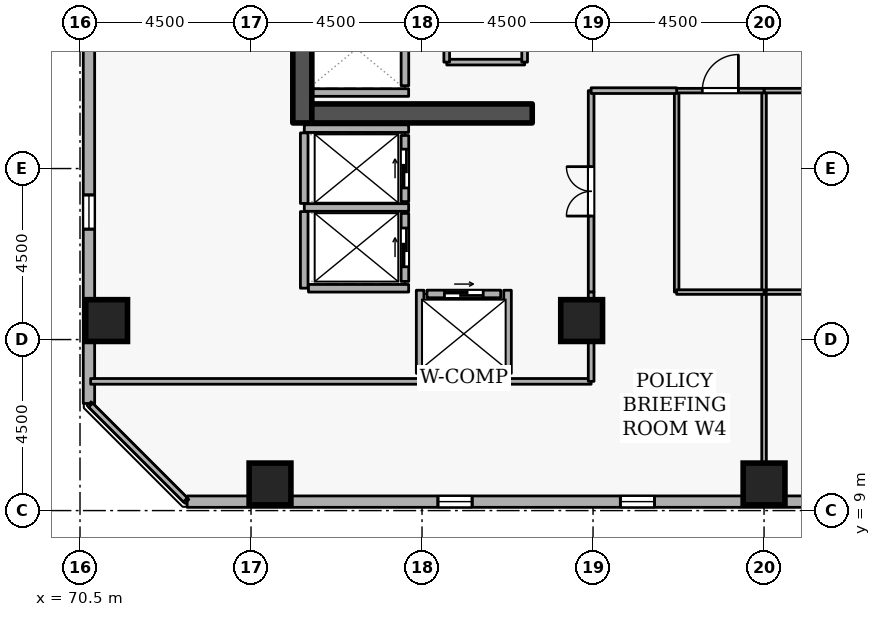
"""IFC4 building model, lengths in metres.
Left out: names, types, materials, properties, quantities, classifications, styles, units other than length and angle.
Written with IfcOpenShell. Run it as: python <this file> out.ifc"""

import sys

from ifc_helpers import new_model, si_unit, direction, frame, frame_2d, origin, origin_2d, place, context, subcontext, project, spatial, rectangle, extrude, element, fill, save


model = new_model("IFC4")
c1 = context("Model", 3, precision=1e-05, world=origin(), true_north=direction((0.0, 1.0)))
c2 = subcontext(c1, "Body", "Model", "MODEL_VIEW")
j1 = project(units=[si_unit("LENGTHUNIT", "METRE"), si_unit("PLANEANGLEUNIT", "RADIAN")], contexts=[c1])
p1 = place(None, origin())
s1 = spatial("IfcSite", under=j1, at=p1, CompositionType="ELEMENT")
p2 = place(p1, origin())
s2 = spatial("IfcBuilding", under=s1, at=p2, CompositionType="ELEMENT")
p3 = place(p2, frame((0.0, 0.0, 167.1)))
s3 = spatial("IfcBuildingStorey", under=s2, at=p3, CompositionType="ELEMENT", Elevation=167.1)
p4 = place(p3, frame((76.35, 19.2, 0.0), z_axis=(0.0, 0.0, 1.0), x_axis=(0.0, 1.0, 0.0)))
e1 = element("IfcWall", 1, at=p4, inside=s3, PredefinedType="SHEAR", context=c2, shape_type="SweptSolid", body=[
    extrude(rectangle(XDim=15.6, YDim=0.5, at=frame_2d((7.8, 0.0))), origin(), (0.0, 0.0, 1.0), 3.6),
])
p5 = place(p3, frame((76.6, 19.45, 0.0), z_axis=(0.0, 0.0, 1.0), x_axis=(1.0, 0.0, 0.0)))
e2 = element("IfcWall", 2, at=p5, inside=s3, PredefinedType="SHEAR", context=c2, shape_type="SweptSolid", body=[
    extrude(rectangle(XDim=5.8, YDim=0.5, at=frame_2d((2.9, 0.0))), origin(), (0.0, 0.0, 1.0), 3.6),
])
for number, where, z_axis, x_axis in (
    (3, (71.2, 14.0, 0.0), (0.0, 0.0, 1.0), (1.0, 0.0, 0.0)),
    (4, (88.5, 9.7, 0.0), (0.0, 0.0, 1.0), (1.0, 0.0, 0.0)),
    (5, (75.5, 9.7, 0.0), (0.0, 0.0, 1.0), (1.0, 0.0, 0.0)),
    (6, (83.7, 14.0, 0.0), (0.0, 0.0, 1.0), (1.0, 0.0, 0.0)),
):
    element("IfcColumn", number, at=place(p3, frame(where, z_axis=z_axis, x_axis=x_axis)), inside=s3, PredefinedType="COLUMN", context=c2, shape_type="SweptSolid", body=[
        extrude(rectangle(XDim=1.1, YDim=1.1, at=origin_2d()), origin(), (0.0, 0.0, 1.0), 3.6),
    ])
p6 = place(p3, frame((73.319, 9.235, 0.0), z_axis=(0.0, 0.0, 1.0), x_axis=(0.999999999634, 2.7061402e-05, 0.0)))
e7 = element("IfcWall", 7, at=p6, inside=s3, PredefinedType="STANDARD", context=c2, shape_type="SweptSolid", body=[
    extrude(rectangle(XDim=36.087, YDim=0.3, at=frame_2d((18.043, 0.0))), origin(), (0.0, 0.0, 1.0), 2.7),
])
p7 = place(p6, frame((6.6, 0.0, 0.72)))
e8 = element("IfcOpeningElement", 8, at=p7, cuts=e7, PredefinedType="OPENING", context=c2, shape_type="SweptSolid", body=[
    extrude(rectangle(XDim=0.9, YDim=1.75, at=frame_2d((0.45, 0.875))), frame((0.0, 0.16, 0.0), z_axis=(0.0, -1.0, 0.0), x_axis=(1.0, 0.0, 0.0)), (0.0, 0.0, 1.0), 0.32),
])
p8 = place(p6, frame((11.4, 0.0, 0.72)))
e9 = element("IfcOpeningElement", 9, at=p8, cuts=e7, PredefinedType="OPENING", context=c2, shape_type="SweptSolid", body=[
    extrude(rectangle(XDim=0.9, YDim=1.75, at=frame_2d((0.45, 0.875))), frame((0.0, 0.16, 0.0), z_axis=(0.0, -1.0, 0.0), x_axis=(1.0, 0.0, 0.0)), (0.0, 0.0, 1.0), 0.32),
])
p9 = place(p6, frame((21.0, 0.0, 0.72)))
e10 = element("IfcOpeningElement", 10, at=p9, cuts=e7, PredefinedType="OPENING", context=c2, shape_type="SweptSolid", body=[
    extrude(rectangle(XDim=0.9, YDim=1.75, at=frame_2d((0.45, 0.875))), frame((0.0, 0.16, 0.0), z_axis=(0.0, -1.0, 0.0), x_axis=(1.0, 0.0, 0.0)), (0.0, 0.0, 1.0), 0.32),
])
p10 = place(p6, frame((25.8, 0.0, 0.72)))
e11 = element("IfcOpeningElement", 11, at=p10, cuts=e7, PredefinedType="OPENING", context=c2, shape_type="SweptSolid", body=[
    extrude(rectangle(XDim=0.9, YDim=1.75, at=frame_2d((0.45, 0.875))), frame((0.0, 0.16, 0.0), z_axis=(0.0, -1.0, 0.0), x_axis=(1.0, 0.0, 0.0)), (0.0, 0.0, 1.0), 0.32),
])
p11 = place(p6, frame((30.6, 0.0, 0.72)))
e12 = element("IfcOpeningElement", 12, at=p11, cuts=e7, PredefinedType="OPENING", context=c2, shape_type="SweptSolid", body=[
    extrude(rectangle(XDim=0.9, YDim=1.75, at=frame_2d((0.45, 0.875))), frame((0.0, 0.16, 0.0), z_axis=(0.0, -1.0, 0.0), x_axis=(1.0, 0.0, 0.0)), (0.0, 0.0, 1.0), 0.32),
])
p12 = place(p3, frame((70.736, 47.906, 0.0), z_axis=(0.0, 0.0, 1.0), x_axis=(-2.7061402e-05, -0.999999999634, 0.0)))
e13 = element("IfcWall", 13, at=p12, inside=s3, PredefinedType="STANDARD", context=c2, shape_type="SweptSolid", body=[
    extrude(rectangle(XDim=36.087, YDim=0.3, at=frame_2d((18.043, 0.0))), origin(), (0.0, 0.0, 1.0), 2.7),
])
p13 = place(p12, frame((1.8, 0.0, 0.72)))
e14 = element("IfcOpeningElement", 14, at=p13, cuts=e13, PredefinedType="OPENING", context=c2, shape_type="SweptSolid", body=[
    extrude(rectangle(XDim=0.9, YDim=1.75, at=frame_2d((0.45, 0.875))), frame((0.0, 0.16, 0.0), z_axis=(0.0, -1.0, 0.0), x_axis=(1.0, 0.0, 0.0)), (0.0, 0.0, 1.0), 0.32),
])
p14 = place(p12, frame((11.4, 0.0, 0.72)))
e15 = element("IfcOpeningElement", 15, at=p14, cuts=e13, PredefinedType="OPENING", context=c2, shape_type="SweptSolid", body=[
    extrude(rectangle(XDim=0.9, YDim=1.75, at=frame_2d((0.45, 0.875))), frame((0.0, 0.16, 0.0), z_axis=(0.0, -1.0, 0.0), x_axis=(1.0, 0.0, 0.0)), (0.0, 0.0, 1.0), 0.32),
])
p15 = place(p12, frame((16.2, 0.0, 0.72)))
e16 = element("IfcOpeningElement", 16, at=p15, cuts=e13, PredefinedType="OPENING", context=c2, shape_type="SweptSolid", body=[
    extrude(rectangle(XDim=0.9, YDim=1.75, at=frame_2d((0.45, 0.875))), frame((0.0, 0.16, 0.0), z_axis=(0.0, -1.0, 0.0), x_axis=(1.0, 0.0, 0.0)), (0.0, 0.0, 1.0), 0.32),
])
p16 = place(p12, frame((25.8, 0.0, 0.72)))
e17 = element("IfcOpeningElement", 17, at=p16, cuts=e13, PredefinedType="OPENING", context=c2, shape_type="SweptSolid", body=[
    extrude(rectangle(XDim=0.9, YDim=1.75, at=frame_2d((0.45, 0.875))), frame((0.0, 0.16, 0.0), z_axis=(0.0, -1.0, 0.0), x_axis=(1.0, 0.0, 0.0)), (0.0, 0.0, 1.0), 0.32),
])
p17 = place(p12, frame((30.6, 0.0, 0.72)))
e18 = element("IfcOpeningElement", 18, at=p17, cuts=e13, PredefinedType="OPENING", context=c2, shape_type="SweptSolid", body=[
    extrude(rectangle(XDim=0.9, YDim=1.75, at=frame_2d((0.45, 0.875))), frame((0.0, 0.16, 0.0), z_axis=(0.0, -1.0, 0.0), x_axis=(1.0, 0.0, 0.0)), (0.0, 0.0, 1.0), 0.32),
])
p18 = place(p3, frame((79.05, 20.18, 0.0), z_axis=(0.0, 0.0, 1.0), x_axis=(0.0, 1.0, 0.0)))
e19 = element("IfcWall", 19, at=p18, inside=s3, PredefinedType="STANDARD", context=c2, shape_type="SweptSolid", body=[
    extrude(rectangle(XDim=1.94, YDim=0.2, at=frame_2d((0.97, 0.0))), origin(), (0.0, 0.0, 1.0), 3.34),
])
p19 = place(p3, frame((79.05, 17.13, 0.0), z_axis=(0.0, 0.0, 1.0), x_axis=(0.0, 1.0, 0.0)))
e20 = element("IfcWall", 20, at=p19, inside=s3, PredefinedType="STANDARD", context=c2, shape_type="SweptSolid", body=[
    extrude(rectangle(XDim=1.74, YDim=0.2, at=frame_2d((0.87, 0.0))), origin(), (0.0, 0.0, 1.0), 3.34),
])
p20 = place(p19, frame((0.36, 0.0, 0.0)))
e21 = element("IfcOpeningElement", 21, at=p20, cuts=e20, PredefinedType="OPENING", context=c2, shape_type="SweptSolid", body=[
    extrude(rectangle(XDim=1.02, YDim=2.06, at=frame_2d((0.51, 1.03))), frame((0.0, 0.11, 0.0), z_axis=(0.0, -1.0, 0.0), x_axis=(1.0, 0.0, 0.0)), (0.0, 0.0, 1.0), 0.22),
])
p21 = place(p3, frame((79.05, 15.03, 0.0), z_axis=(0.0, 0.0, 1.0), x_axis=(0.0, 1.0, 0.0)))
e22 = element("IfcWall", 22, at=p21, inside=s3, PredefinedType="STANDARD", context=c2, shape_type="SweptSolid", body=[
    extrude(rectangle(XDim=1.79, YDim=0.2, at=frame_2d((0.895, 0.0))), origin(), (0.0, 0.0, 1.0), 3.34),
])
p22 = place(p21, frame((0.385, 0.0, 0.0)))
e23 = element("IfcOpeningElement", 23, at=p22, cuts=e22, PredefinedType="OPENING", context=c2, shape_type="SweptSolid", body=[
    extrude(rectangle(XDim=1.02, YDim=2.06, at=frame_2d((0.51, 1.03))), frame((0.0, 0.11, 0.0), z_axis=(0.0, -1.0, 0.0), x_axis=(1.0, 0.0, 0.0)), (0.0, 0.0, 1.0), 0.22),
])
p23 = place(p3, frame((79.63, 14.7, 0.0), z_axis=(0.0, 0.0, 1.0), x_axis=(1.0, 0.0, 0.0)))
e24 = element("IfcWall", 24, at=p23, inside=s3, PredefinedType="STANDARD", context=c2, shape_type="SweptSolid", body=[
    extrude(rectangle(XDim=1.94, YDim=0.2, at=frame_2d((0.97, 0.0))), origin(), (0.0, 0.0, 1.0), 3.34),
])
p24 = place(p23, frame((0.46, 0.0, 0.0)))
e25 = element("IfcOpeningElement", 25, at=p24, cuts=e24, PredefinedType="OPENING", context=c2, shape_type="SweptSolid", body=[
    extrude(rectangle(XDim=1.02, YDim=2.06, at=frame_2d((0.51, 1.03))), frame((0.0, 0.11, 0.0), z_axis=(0.0, -1.0, 0.0), x_axis=(1.0, 0.0, 0.0)), (0.0, 0.0, 1.0), 0.22),
])
p25 = place(p3, frame((76.612, 20.0, 0.0), z_axis=(0.0, 0.0, 1.0), x_axis=(1.0, 0.0, 0.0)))
e26 = element("IfcWall", 26, at=p25, inside=s3, PredefinedType="STANDARD", context=c2, shape_type="SweptSolid", body=[
    extrude(rectangle(XDim=2.536, YDim=0.2, at=frame_2d((1.268, 0.0))), origin(), (0.0, 0.0, 1.0), 3.34),
])
p26 = place(p3, frame((76.402, 19.05, 0.0), z_axis=(0.0, 0.0, 1.0), x_axis=(1.0, 0.0, 0.0)))
e27 = element("IfcWall", 27, at=p26, inside=s3, PredefinedType="STANDARD", context=c2, shape_type="SweptSolid", body=[
    extrude(rectangle(XDim=2.746, YDim=0.2, at=frame_2d((1.373, 0.0))), origin(), (0.0, 0.0, 1.0), 2.545),
])
p27 = place(p3, frame((76.402, 16.975, 0.0), z_axis=(0.0, 0.0, 1.0), x_axis=(1.0, 0.0, 0.0)))
e28 = element("IfcWall", 28, at=p27, inside=s3, PredefinedType="STANDARD", context=c2, shape_type="SweptSolid", body=[
    extrude(rectangle(XDim=2.746, YDim=0.2, at=frame_2d((1.373, 0.0))), origin(), (0.0, 0.0, 1.0), 3.34),
])
p28 = place(p3, frame((76.4, 14.852, 0.0), z_axis=(0.0, 0.0, 1.0), x_axis=(0.0, 1.0, 0.0)))
e29 = element("IfcWall", 29, at=p28, inside=s3, PredefinedType="STANDARD", context=c2, shape_type="SweptSolid", body=[
    extrude(rectangle(XDim=2.016, YDim=0.2, at=frame_2d((1.008, 0.0))), origin(), (0.0, 0.0, 1.0), 3.34),
])
p29 = place(p3, frame((76.4, 17.082, 0.0), z_axis=(0.0, 0.0, 1.0), x_axis=(0.0, 1.0, 0.0)))
e30 = element("IfcWall", 30, at=p29, inside=s3, PredefinedType="STANDARD", context=c2, shape_type="SweptSolid", body=[
    extrude(rectangle(XDim=1.856, YDim=0.2, at=frame_2d((0.928, 0.0))), origin(), (0.0, 0.0, 1.0), 3.34),
])
p30 = place(p3, frame((76.512, 14.85, 0.0), z_axis=(0.0, 0.0, 1.0), x_axis=(1.0, 0.0, 0.0)))
e31 = element("IfcWall", 31, at=p30, inside=s3, PredefinedType="STANDARD", context=c2, shape_type="SweptSolid", body=[
    extrude(rectangle(XDim=2.636, YDim=0.2, at=frame_2d((1.318, 0.0))), origin(), (0.0, 0.0, 1.0), 3.34),
])
p31 = place(p3, frame((79.452, 12.5, 0.0), z_axis=(0.0, 0.0, 1.0), x_axis=(1.0, 0.0, 0.0)))
e32 = element("IfcWall", 32, at=p31, inside=s3, PredefinedType="STANDARD", context=c2, shape_type="SweptSolid", body=[
    extrude(rectangle(XDim=2.296, YDim=0.2, at=frame_2d((1.148, 0.0))), origin(), (0.0, 0.0, 1.0), 3.34),
])
for number, where, z_axis, x_axis in (
    (33, (81.75, 12.612, 0.0), (0.0, 0.0, 1.0), (0.0, 1.0, 0.0)),
    (34, (79.45, 12.612, 0.0), (0.0, 0.0, 1.0), (0.0, 1.0, 0.0)),
):
    element("IfcWall", number, at=place(p3, frame(where, z_axis=z_axis, x_axis=x_axis)), inside=s3, PredefinedType="STANDARD", context=c2, shape_type="SweptSolid", body=[
        extrude(rectangle(XDim=2.186, YDim=0.2, at=frame_2d((1.093, 0.0))), origin(), (0.0, 0.0, 1.0), 3.34),
    ])
p32 = place(p3, frame((82.2, 20.8, 0.0), z_axis=(0.0, 0.0, 1.0), x_axis=(-1.0, 0.0, 0.0)))
e35 = element("IfcWall", 35, at=p32, inside=s3, PredefinedType="PARTITIONING", context=c2, shape_type="SweptSolid", body=[
    extrude(rectangle(XDim=2.05, YDim=0.15, at=frame_2d((1.025, 0.0))), origin(), (0.0, 0.0, 1.0), 3.34),
])
p33 = place(p3, frame((80.15, 20.8, 0.0), z_axis=(0.0, 0.0, 1.0), x_axis=(0.0, 1.0, 0.0)))
e36 = element("IfcWall", 36, at=p33, inside=s3, PredefinedType="PARTITIONING", context=c2, shape_type="SweptSolid", body=[
    extrude(rectangle(XDim=3.25, YDim=0.15, at=frame_2d((1.625, 0.0))), origin(), (0.0, 0.0, 1.0), 3.34),
])
p34 = place(p3, frame((82.2, 24.05, 0.0), z_axis=(0.0, 0.0, 1.0), x_axis=(0.0, -1.0, 0.0)))
e37 = element("IfcWall", 37, at=p34, inside=s3, PredefinedType="PARTITIONING", context=c2, shape_type="SweptSolid", body=[
    extrude(rectangle(XDim=3.25, YDim=0.15, at=frame_2d((1.625, 0.0))), origin(), (0.0, 0.0, 1.0), 3.34),
])
p35 = place(p34, frame((1.165, 0.0, 0.0)))
e38 = element("IfcOpeningElement", 38, at=p35, cuts=e37, PredefinedType="OPENING", context=c2, shape_type="SweptSolid", body=[
    extrude(rectangle(XDim=0.92, YDim=2.08, at=frame_2d((0.46, 1.04))), frame((0.0, 0.085, 0.0), z_axis=(0.0, -1.0, 0.0), x_axis=(1.0, 0.0, 0.0)), (0.0, 0.0, 1.0), 0.17),
])
p36 = place(p3, frame((88.5, 9.28, 0.0), z_axis=(0.0, 0.0, 1.0), x_axis=(0.0, 1.0, 0.0)))
e39 = element("IfcWall", 39, at=p36, inside=s3, PredefinedType="PARTITIONING", context=c2, shape_type="SweptSolid", body=[
    extrude(rectangle(XDim=5.47, YDim=0.12, at=frame_2d((2.735, 0.0))), origin(), (0.0, 0.0, 1.0), 2.882),
])
p37 = place(p3, frame((88.5, 14.75, 0.0), z_axis=(0.0, 0.0, 1.0), x_axis=(1.0, 0.0, 0.0)))
e40 = element("IfcWall", 40, at=p37, inside=s3, PredefinedType="PARTITIONING", context=c2, shape_type="SweptSolid", body=[
    extrude(rectangle(XDim=4.55, YDim=0.12, at=frame_2d((2.275, 0.0))), origin(), (0.0, 0.0, 1.0), 3.34),
])
p38 = place(p3, frame((88.5, 14.75, 0.0), z_axis=(0.0, 0.0, 1.0), x_axis=(0.0, 1.0, 0.0)))
e41 = element("IfcWall", 41, at=p38, inside=s3, PredefinedType="PARTITIONING", context=c2, shape_type="SweptSolid", body=[
    extrude(rectangle(XDim=5.3, YDim=0.12, at=frame_2d((2.65, 0.0))), origin(), (0.0, 0.0, 1.0), 2.882),
])
p39 = place(p3, frame((88.5, 20.05, 0.0), z_axis=(0.0, 0.0, 1.0), x_axis=(1.0, 0.0, 0.0)))
e42 = element("IfcWall", 42, at=p39, inside=s3, PredefinedType="PARTITIONING", context=c2, shape_type="SweptSolid", body=[
    extrude(rectangle(XDim=4.55, YDim=0.12, at=frame_2d((2.275, 0.0))), origin(), (0.0, 0.0, 1.0), 3.34),
])
p40 = place(p3, frame((86.2, 14.75, 0.0), z_axis=(0.0, 0.0, 1.0), x_axis=(0.0, 1.0, 0.0)))
e43 = element("IfcWall", 43, at=p40, inside=s3, PredefinedType="PARTITIONING", context=c2, shape_type="SweptSolid", body=[
    extrude(rectangle(XDim=5.3, YDim=0.12, at=frame_2d((2.65, 0.0))), origin(), (0.0, 0.0, 1.0), 3.34),
])
p41 = place(p3, frame((86.2, 20.05, 0.0), z_axis=(0.0, 0.0, 1.0), x_axis=(1.0, 0.0, 0.0)))
e44 = element("IfcWall", 44, at=p41, inside=s3, PredefinedType="PARTITIONING", context=c2, shape_type="SweptSolid", body=[
    extrude(rectangle(XDim=2.3, YDim=0.12, at=frame_2d((1.15, 0.0))), origin(), (0.0, 0.0, 1.0), 3.34),
])
p42 = place(p41, frame((0.675, 0.0, 0.0)))
e45 = element("IfcOpeningElement", 45, at=p42, cuts=e44, PredefinedType="OPENING", context=c2, shape_type="SweptSolid", body=[
    extrude(rectangle(XDim=0.95, YDim=2.1, at=frame_2d((0.475, 1.05))), frame((0.0, 0.07, 0.0), z_axis=(0.0, -1.0, 0.0), x_axis=(1.0, 0.0, 0.0)), (0.0, 0.0, 1.0), 0.14),
])
p43 = place(p3, frame((88.5, 14.75, 0.0), z_axis=(0.0, 0.0, 1.0), x_axis=(-1.0, 0.0, 0.0)))
e46 = element("IfcWall", 46, at=p43, inside=s3, PredefinedType="PARTITIONING", context=c2, shape_type="SweptSolid", body=[
    extrude(rectangle(XDim=2.3, YDim=0.12, at=frame_2d((1.15, 0.0))), origin(), (0.0, 0.0, 1.0), 3.34),
])
p44 = place(p3, frame((83.95, 14.75, 0.0), z_axis=(0.0, 0.0, 1.0), x_axis=(0.0, 1.0, 0.0)))
e47 = element("IfcWall", 47, at=p44, inside=s3, PredefinedType="PARTITIONING", context=c2, shape_type="SweptSolid", body=[
    extrude(rectangle(XDim=5.3, YDim=0.15, at=frame_2d((2.65, 0.0))), origin(), (0.0, 0.0, 1.0), 3.34),
])
p45 = place(p44, frame((2.0, 0.0, 0.0)))
e48 = element("IfcOpeningElement", 48, at=p45, cuts=e47, PredefinedType="OPENING", context=c2, shape_type="SweptSolid", body=[
    extrude(rectangle(XDim=1.3, YDim=2.12, at=frame_2d((0.65, 1.06))), frame((0.0, 0.085, 0.0), z_axis=(0.0, -1.0, 0.0), x_axis=(1.0, 0.0, 0.0)), (0.0, 0.0, 1.0), 0.17),
])
p46 = place(p3, frame((83.95, 20.05, 0.0), z_axis=(0.0, 0.0, 1.0), x_axis=(1.0, 0.0, 0.0)))
e49 = element("IfcWall", 49, at=p46, inside=s3, PredefinedType="PARTITIONING", context=c2, shape_type="SweptSolid", body=[
    extrude(rectangle(XDim=2.25, YDim=0.15, at=frame_2d((1.125, 0.0))), origin(), (0.0, 0.0, 1.0), 3.34),
])
p47 = place(p3, frame((73.275, 9.28, 0.0), z_axis=(0.0, 0.0, 1.0), x_axis=(-0.707106781187, 0.707106781187, 0.0)))
e50 = element("IfcWall", 50, at=p47, inside=s3, PredefinedType="PARTITIONING", context=c2, shape_type="SweptSolid", body=[
    extrude(rectangle(XDim=3.528, YDim=0.15, at=frame_2d((1.764, 0.0))), origin(), (0.0, 0.0, 1.0), 3.34),
])
p48 = place(p3, frame((70.78, 12.4, 0.0), z_axis=(0.0, 0.0, 1.0), x_axis=(1.0, 0.0, 0.0)))
e51 = element("IfcWall", 51, at=p48, inside=s3, PredefinedType="PARTITIONING", context=c2, shape_type="SweptSolid", body=[
    extrude(rectangle(XDim=8.672, YDim=0.15, at=frame_2d((4.336, 0.0))), origin(), (0.0, 0.0, 1.0), 3.34),
])
p49 = place(p3, frame((81.748, 12.4, 0.0), z_axis=(0.0, 0.0, 1.0), x_axis=(1.0, 0.0, 0.0)))
e52 = element("IfcWall", 52, at=p49, inside=s3, PredefinedType="PARTITIONING", context=c2, shape_type="SweptSolid", body=[
    extrude(rectangle(XDim=2.202, YDim=0.15, at=frame_2d((1.101, 0.0))), origin(), (0.0, 0.0, 1.0), 3.34),
])
p50 = place(p3, frame((83.95, 12.4, 0.0), z_axis=(0.0, 0.0, 1.0), x_axis=(0.0, 1.0, 0.0)))
e53 = element("IfcWall", 53, at=p50, inside=s3, PredefinedType="PARTITIONING", context=c2, shape_type="SweptSolid", body=[
    extrude(rectangle(XDim=2.35, YDim=0.15, at=frame_2d((1.175, 0.0))), origin(), (0.0, 0.0, 1.0), 3.34),
])
p51 = place(p7, origin())
e54 = element("IfcWindow", 54, at=p51, inside=s3, PartitioningType="SINGLE_PANEL", PredefinedType="WINDOW", context=c2, shape_type="SweptSolid", body=[
    extrude(rectangle(XDim=0.9, YDim=1.75, at=frame_2d((0.45, 0.875))), frame((0.0, 0.03, 0.0), z_axis=(0.0, -1.0, 0.0), x_axis=(1.0, 0.0, 0.0)), (0.0, 0.0, 1.0), 0.06),
])
fill(e8, e54)
p52 = place(p8, origin())
e55 = element("IfcWindow", 55, at=p52, inside=s3, PartitioningType="SINGLE_PANEL", PredefinedType="WINDOW", context=c2, shape_type="SweptSolid", body=[
    extrude(rectangle(XDim=0.9, YDim=1.75, at=frame_2d((0.45, 0.875))), frame((0.0, 0.03, 0.0), z_axis=(0.0, -1.0, 0.0), x_axis=(1.0, 0.0, 0.0)), (0.0, 0.0, 1.0), 0.06),
])
fill(e9, e55)
p53 = place(p17, origin())
e56 = element("IfcWindow", 56, at=p53, inside=s3, PartitioningType="SINGLE_PANEL", PredefinedType="WINDOW", context=c2, shape_type="SweptSolid", body=[
    extrude(rectangle(XDim=0.9, YDim=1.75, at=frame_2d((0.45, 0.875))), frame((0.0, 0.03, 0.0), z_axis=(0.0, -1.0, 0.0), x_axis=(1.0, 0.0, 0.0)), (0.0, 0.0, 1.0), 0.06),
])
fill(e18, e56)
p54 = place(p20, origin())
e57 = element("IfcDoor", 57, at=p54, inside=s3, OperationType="SLIDING_TO_LEFT", PredefinedType="DOOR", context=c2, shape_type="SweptSolid", body=[
    extrude(rectangle(XDim=1.02, YDim=2.06, at=frame_2d((0.51, 1.03))), frame((0.0, 0.025, 0.0), z_axis=(0.0, -1.0, 0.0), x_axis=(1.0, 0.0, 0.0)), (0.0, 0.0, 1.0), 0.05),
])
fill(e21, e57)
p55 = place(p22, origin())
e58 = element("IfcDoor", 58, at=p55, inside=s3, OperationType="SLIDING_TO_LEFT", PredefinedType="DOOR", context=c2, shape_type="SweptSolid", body=[
    extrude(rectangle(XDim=1.02, YDim=2.06, at=frame_2d((0.51, 1.03))), frame((0.0, 0.025, 0.0), z_axis=(0.0, -1.0, 0.0), x_axis=(1.0, 0.0, 0.0)), (0.0, 0.0, 1.0), 0.05),
])
fill(e23, e58)
p56 = place(p24, origin())
e59 = element("IfcDoor", 59, at=p56, inside=s3, OperationType="SLIDING_TO_LEFT", PredefinedType="DOOR", context=c2, shape_type="SweptSolid", body=[
    extrude(rectangle(XDim=1.02, YDim=2.06, at=frame_2d((0.51, 1.03))), frame((0.0, 0.025, 0.0), z_axis=(0.0, -1.0, 0.0), x_axis=(1.0, 0.0, 0.0)), (0.0, 0.0, 1.0), 0.05),
])
fill(e25, e59)
p57 = place(p42, origin())
e60 = element("IfcDoor", 60, at=p57, inside=s3, OperationType="SINGLE_SWING_RIGHT", PredefinedType="DOOR", context=c2, shape_type="SweptSolid", body=[
    extrude(rectangle(XDim=0.95, YDim=2.1, at=frame_2d((0.475, 1.05))), frame((0.0, 0.025, 0.0), z_axis=(0.0, -1.0, 0.0), x_axis=(1.0, 0.0, 0.0)), (0.0, 0.0, 1.0), 0.05),
])
fill(e45, e60)
p58 = place(p45, origin())
e61 = element("IfcDoor", 61, at=p58, inside=s3, OperationType="DOUBLE_DOOR_SINGLE_SWING", PredefinedType="DOOR", context=c2, shape_type="SweptSolid", body=[
    extrude(rectangle(XDim=1.3, YDim=2.12, at=frame_2d((0.65, 1.06))), frame((0.0, 0.025, 0.0), z_axis=(0.0, -1.0, 0.0), x_axis=(1.0, 0.0, 0.0)), (0.0, 0.0, 1.0), 0.05),
])
fill(e48, e61)
save(model, sys.argv[1])
